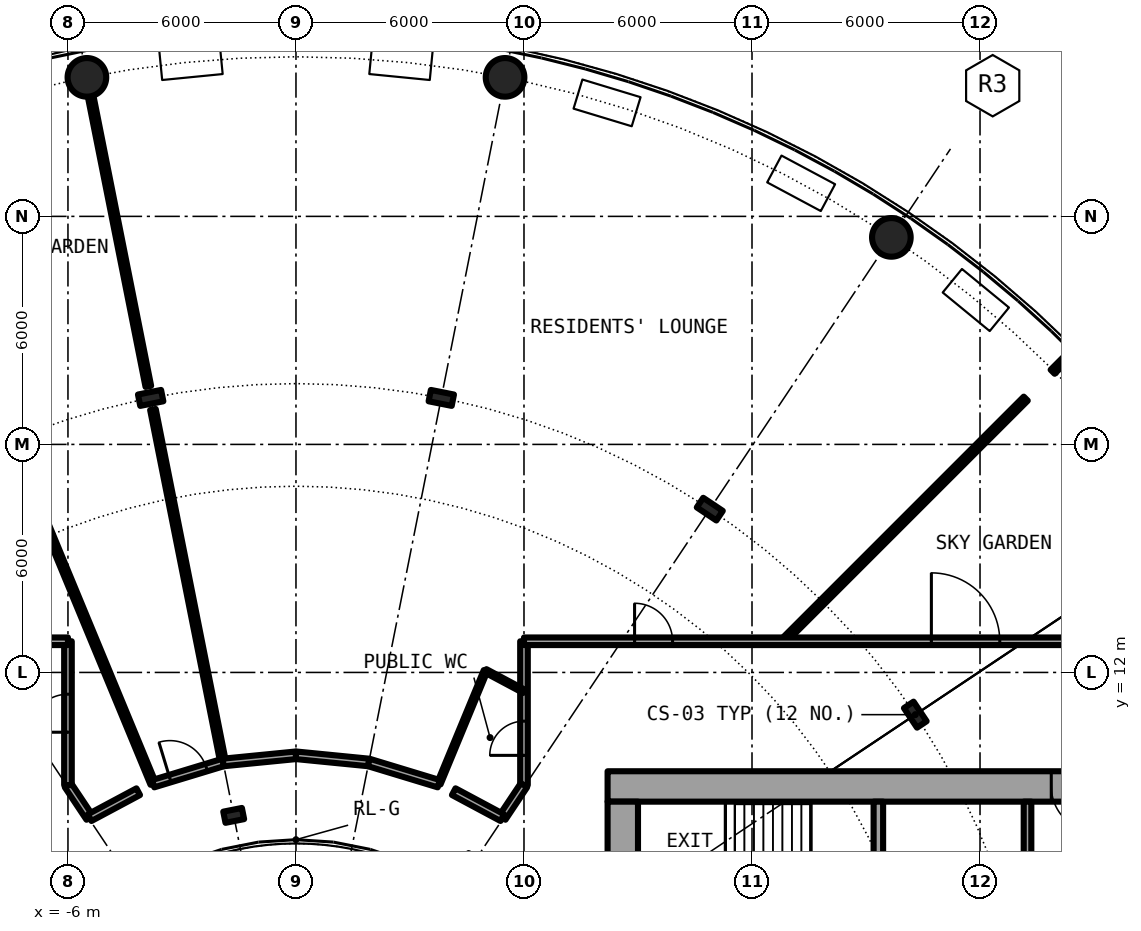
"""IFC4 building model, lengths in metres.
Left out: names, types, materials, properties, quantities, classifications, styles, units other than length and angle.
Written with IfcOpenShell. Run it as: python <this file> out.ifc"""

import sys

from ifc_helpers import new_model, si_unit, direction, frame, frame_2d, origin, origin_2d, place, context, subcontext, project, spatial, rectangle, hollow_circle, i_section, extrude, element, fill, save


model = new_model("IFC4")
c1 = context("Model", 3, precision=1e-05, world=origin(), true_north=direction((0.0, 1.0)))
c2 = subcontext(c1, "Body", "Model", "MODEL_VIEW")
j1 = project(units=[si_unit("LENGTHUNIT", "METRE"), si_unit("PLANEANGLEUNIT", "RADIAN")], contexts=[c1])
p1 = place(None, origin())
s1 = spatial("IfcSite", under=j1, at=p1, CompositionType="ELEMENT")
p2 = place(p1, origin())
s2 = spatial("IfcBuilding", under=s1, at=p2, CompositionType="ELEMENT")
p3 = place(p2, frame((0.0, 0.0, 57.5)))
s3 = spatial("IfcBuildingStorey", under=s2, at=p3, CompositionType="ELEMENT", Elevation=57.5)
for number, where, z_axis, x_axis in (
    (1, (15.667, 23.448, 0.0), (0.0, 0.0, 1.0), (1.0, 0.0, 0.0)),
    (2, (5.501, 27.658, 0.0), (0.0, 0.0, 1.0), (1.0, 0.0, 0.0)),
    (3, (-5.501, 27.658, 0.0), (0.0, 0.0, 1.0), (1.0, 0.0, 0.0)),
):
    element("IfcColumn", number, at=place(p3, frame(where, z_axis=z_axis, x_axis=x_axis)), inside=s3, PredefinedType="COLUMN", context=c2, shape_type="SweptSolid", body=[
        extrude(hollow_circle(Radius=0.508, WallThickness=0.05, at=origin_2d()), origin(), (0.0, 0.0, 1.0), 6.1),
    ])
for number, where, z_axis, x_axis in (
    (4, (16.297, 10.889, 0.0), (0.0, 0.0, 1.0), (0.831, 0.556, 0.0)),
    (5, (10.889, 16.297, 0.0), (0.0, 0.0, 1.0), (0.556, 0.831, 0.0)),
    (6, (3.824, 19.223, 0.0), (0.0, 0.0, 1.0), (0.195, 0.981, 0.0)),
    (7, (-3.824, 19.223, 0.0), (0.0, 0.0, 1.0), (-0.195, 0.981, 0.0)),
):
    element("IfcColumn", number, at=place(p3, frame(where, z_axis=z_axis, x_axis=x_axis)), inside=s3, PredefinedType="COLUMN", context=c2, shape_type="SweptSolid", body=[
        extrude(i_section(OverallWidth=0.305, OverallDepth=0.62, WebThickness=0.021, FlangeThickness=0.04, FilletRadius=0.027, at=origin_2d()), origin(), (0.0, 0.0, 1.0), 6.1),
    ])
p4 = place(p3, frame((-1.639, 8.239, 0.0), z_axis=(0.0, 0.0, 1.0), x_axis=(-0.195090322016, 0.980785280403, 0.0)))
e8 = element("IfcColumn", 8, at=p4, inside=s3, PredefinedType="COLUMN", context=c2, shape_type="SweptSolid", body=[
    extrude(i_section(OverallWidth=0.3, OverallDepth=0.5, WebThickness=0.014, FlangeThickness=0.028, FilletRadius=0.027, at=origin_2d()), origin(), (0.0, 0.0, 1.0), 6.1),
])
p5 = place(p3, frame((22.4, 9.0, 0.0), z_axis=(0.0, 0.0, 1.0), x_axis=(-1.0, 0.0, 0.0)))
e9 = element("IfcWall", 9, at=p5, inside=s3, PredefinedType="SHEAR", context=c2, shape_type="SweptSolid", body=[
    extrude(rectangle(XDim=14.2, YDim=0.8, at=frame_2d((7.1, 0.0))), origin(), (0.0, 0.0, 1.0), 6.1),
])
p6 = place(p5, frame((1.325, 0.0, 0.0)))
e10 = element("IfcOpeningElement", 10, at=p6, cuts=e9, PredefinedType="OPENING", context=c2, shape_type="SweptSolid", body=[
    extrude(rectangle(XDim=1.2, YDim=2.3, at=frame_2d((0.6, 1.15))), frame((0.0, 0.41, 0.0), z_axis=(0.0, -1.0, 0.0), x_axis=(1.0, 0.0, 0.0)), (0.0, 0.0, 1.0), 0.82),
])
p7 = place(p3, frame((8.6, -8.6, 0.0), z_axis=(0.0, 0.0, 1.0), x_axis=(0.0, 1.0, 0.0)))
e11 = element("IfcWall", 11, at=p7, inside=s3, PredefinedType="SHEAR", context=c2, shape_type="SweptSolid", body=[
    extrude(rectangle(XDim=17.2, YDim=0.8, at=frame_2d((8.6, 0.0))), origin(), (0.0, 0.0, 1.0), 6.1),
])
p8 = place(p7, frame((7.4, 0.0, 0.1)))
e12 = element("IfcOpeningElement", 12, at=p8, cuts=e11, PredefinedType="OPENING", context=c2, shape_type="SweptSolid", body=[
    extrude(rectangle(XDim=2.4, YDim=2.2, at=frame_2d((1.2, 1.1))), frame((0.0, 0.41, 0.0), z_axis=(0.0, -1.0, 0.0), x_axis=(1.0, 0.0, 0.0)), (0.0, 0.0, 1.0), 0.82),
])
p9 = place(p3, frame((15.325, 4.65, 0.0), z_axis=(0.0, 0.0, 1.0), x_axis=(0.0, 1.0, 0.0)))
e13 = element("IfcWall", 13, at=p9, inside=s3, PredefinedType="SHEAR", context=c2, shape_type="SweptSolid", body=[
    extrude(rectangle(XDim=3.95, YDim=0.25, at=frame_2d((1.975, 0.0))), origin(), (0.0, 0.0, 1.0), 6.1),
])
p10 = place(p9, frame((1.375, 0.0, 0.0)))
e14 = element("IfcOpeningElement", 14, at=p10, cuts=e13, PredefinedType="OPENING", context=c2, shape_type="SweptSolid", body=[
    extrude(rectangle(XDim=1.2, YDim=2.3, at=frame_2d((0.6, 1.15))), frame((0.0, 0.135, 0.0), z_axis=(0.0, -1.0, 0.0), x_axis=(1.0, 0.0, 0.0)), (0.0, 0.0, 1.0), 0.27),
])
p11 = place(p3, frame((19.25, 1.575, 0.0), z_axis=(0.0, 0.0, 1.0), x_axis=(0.0, 1.0, 0.0)))
e15 = element("IfcWall", 15, at=p11, inside=s3, PredefinedType="SOLIDWALL", context=c2, shape_type="SweptSolid", body=[
    extrude(rectangle(XDim=7.025, YDim=0.2, at=frame_2d((3.513, 0.0))), origin(), (0.0, 0.0, 1.0), 5.75),
])
p12 = place(p11, frame((4.475, 0.0, 0.0)))
e16 = element("IfcOpeningElement", 16, at=p12, cuts=e15, PredefinedType="OPENING", context=c2, shape_type="SweptSolid", body=[
    extrude(rectangle(XDim=1.1, YDim=2.3, at=frame_2d((0.55, 1.15))), frame((0.0, 0.11, 0.0), z_axis=(0.0, -1.0, 0.0), x_axis=(1.0, 0.0, 0.0)), (0.0, 0.0, 1.0), 0.22),
])
p13 = place(p3, frame((6.0, 9.034, 0.0), z_axis=(0.0, 0.0, 1.0), x_axis=(0.0, 1.0, 0.0)))
e17 = element("IfcWall", 17, at=p13, inside=s3, PredefinedType="PARTITIONING", context=c2, shape_type="SweptSolid", body=[
    extrude(rectangle(XDim=3.786, YDim=0.2, at=frame_2d((1.893, 0.0))), origin(), (0.0, 0.0, 1.0), 5.75),
])
p14 = place(p13, frame((0.784, 0.0, 0.0)))
e18 = element("IfcOpeningElement", 18, at=p14, cuts=e17, PredefinedType="OPENING", context=c2, shape_type="SweptSolid", body=[
    extrude(rectangle(XDim=0.9, YDim=2.3, at=frame_2d((0.45, 1.15))), frame((0.0, 0.11, 0.0), z_axis=(0.0, -1.0, 0.0), x_axis=(1.0, 0.0, 0.0)), (0.0, 0.0, 1.0), 0.22),
])
p15 = place(p3, frame((-10.393, 25.091, 0.0), z_axis=(0.0, 0.0, 1.0), x_axis=(0.382668905709, -0.923885549516, 0.0)))
e19 = element("IfcWall", 19, at=p15, inside=s3, PredefinedType="PARTITIONING", context=c2, shape_type="SweptSolid", body=[
    extrude(rectangle(XDim=17.339, YDim=0.15, at=frame_2d((8.669, 0.0))), origin(), (0.0, 0.0, 1.0), 5.75),
])
p16 = place(p3, frame((-5.405, 27.169, 0.0), z_axis=(0.0, 0.0, 1.0), x_axis=(0.195085619607, -0.980786215759, 0.0)))
e20 = element("IfcWall", 20, at=p16, inside=s3, PredefinedType="PARTITIONING", context=c2, shape_type="SweptSolid", body=[
    extrude(rectangle(XDim=7.792, YDim=0.15, at=frame_2d((3.896, 0.0))), origin(), (0.0, 0.0, 1.0), 5.75),
])
p17 = place(p3, frame((-3.764, 18.919, 0.0), z_axis=(0.0, 0.0, 1.0), x_axis=(0.195134385789, -0.980776514545, 0.0)))
e21 = element("IfcWall", 21, at=p17, inside=s3, PredefinedType="PARTITIONING", context=c2, shape_type="SweptSolid", body=[
    extrude(rectangle(XDim=9.47, YDim=0.15, at=frame_2d((4.735, 0.0))), origin(), (0.0, 0.0, 1.0), 5.75),
])
p18 = place(p3, frame((3.758, 9.072, 0.0), z_axis=(0.0, 0.0, 1.0), x_axis=(0.382517205945, 0.923948368231, 0.0)))
e22 = element("IfcWall", 22, at=p18, inside=s3, PredefinedType="PARTITIONING", context=c2, shape_type="SweptSolid", body=[
    extrude(rectangle(XDim=3.216, YDim=0.1, at=frame_2d((1.608, 0.0))), origin(), (0.0, 0.0, 1.0), 5.75),
])
p19 = place(p3, frame((12.82, 12.82, 0.0), z_axis=(0.0, 0.0, 1.0), x_axis=(0.707106781187, 0.707106781187, 0.0)))
e23 = element("IfcWall", 23, at=p19, inside=s3, PredefinedType="PARTITIONING", context=c2, shape_type="SweptSolid", body=[
    extrude(rectangle(XDim=9.028, YDim=0.15, at=frame_2d((4.514, 0.0))), origin(), (0.0, 0.0, 1.0), 5.75),
])
p20 = place(p3, frame((19.911, 19.911, 0.0), z_axis=(0.0, 0.0, 1.0), x_axis=(0.707106781187, 0.707106781187, 0.0)))
e24 = element("IfcWall", 24, at=p20, inside=s3, PredefinedType="PARTITIONING", context=c2, shape_type="SweptSolid", body=[
    extrude(rectangle(XDim=0.642, YDim=0.15, at=frame_2d((0.321, 0.0))), origin(), (0.0, 0.0, 1.0), 5.75),
])
for number, where, z_axis, x_axis in (
    (25, (-6.0, 9.034, 0.0), (0.0, 0.0, 1.0), (0.555, -0.832, 0.0)),
    (26, (5.429, 8.179, 0.0), (0.0, 0.0, 1.0), (0.555, 0.832, 0.0)),
):
    element("IfcWall", number, at=place(p3, frame(where, z_axis=z_axis, x_axis=x_axis)), inside=s3, PredefinedType="PARTITIONING", context=c2, shape_type="SweptSolid", body=[
        extrude(rectangle(XDim=1.028, YDim=0.2, at=frame_2d((0.514, 0.0))), origin(), (0.0, 0.0, 1.0), 5.75),
    ])
p21 = place(p3, frame((-6.0, 9.034, 0.0), z_axis=(0.0, 0.0, 1.0), x_axis=(0.0, 1.0, 0.0)))
e27 = element("IfcWall", 27, at=p21, inside=s3, PredefinedType="PARTITIONING", context=c2, shape_type="SweptSolid", body=[
    extrude(rectangle(XDim=3.786, YDim=0.2, at=frame_2d((1.893, 0.0))), origin(), (0.0, 0.0, 1.0), 5.75),
])
p22 = place(p21, frame((1.393, 0.0, 0.0)))
e28 = element("IfcOpeningElement", 28, at=p22, cuts=e27, PredefinedType="OPENING", context=c2, shape_type="SweptSolid", body=[
    extrude(rectangle(XDim=1.0, YDim=2.3, at=frame_2d((0.5, 1.15))), frame((0.0, 0.11, 0.0), z_axis=(0.0, -1.0, 0.0), x_axis=(1.0, 0.0, 0.0)), (0.0, 0.0, 1.0), 0.22),
])
p23 = place(p3, frame((-5.429, 8.179, 0.0), z_axis=(0.0, 0.0, 1.0), x_axis=(0.88193287619, 0.471375011954, 0.0)))
e29 = element("IfcWall", 29, at=p23, inside=s3, PredefinedType="PARTITIONING", context=c2, shape_type="SweptSolid", body=[
    extrude(rectangle(XDim=1.449, YDim=0.2, at=frame_2d((0.725, 0.0))), origin(), (0.0, 0.0, 1.0), 5.75),
])
p24 = place(p3, frame((-3.758, 9.072, 0.0), z_axis=(0.0, 0.0, 1.0), x_axis=(0.956896312675, 0.29042976223, 0.0)))
e30 = element("IfcWall", 30, at=p24, inside=s3, PredefinedType="PARTITIONING", context=c2, shape_type="SweptSolid", body=[
    extrude(rectangle(XDim=1.925, YDim=0.2, at=frame_2d((0.962, 0.0))), origin(), (0.0, 0.0, 1.0), 5.75),
])
p25 = place(p24, frame((0.462, 0.0, 0.0)))
e31 = element("IfcOpeningElement", 31, at=p25, cuts=e30, PredefinedType="OPENING", context=c2, shape_type="SweptSolid", body=[
    extrude(rectangle(XDim=1.0, YDim=2.3, at=frame_2d((0.5, 1.15))), frame((0.0, 0.11, 0.0), z_axis=(0.0, -1.0, 0.0), x_axis=(1.0, 0.0, 0.0)), (0.0, 0.0, 1.0), 0.22),
])
for number, where, z_axis, x_axis in (
    (32, (-1.916, 9.631, 0.0), (0.0, 0.0, 1.0), (0.995, 0.098, 0.0)),
    (33, (0.0, 9.82, 0.0), (0.0, 0.0, 1.0), (0.995, -0.098, 0.0)),
):
    element("IfcWall", number, at=place(p3, frame(where, z_axis=z_axis, x_axis=x_axis)), inside=s3, PredefinedType="PARTITIONING", context=c2, shape_type="SweptSolid", body=[
        extrude(rectangle(XDim=1.925, YDim=0.2, at=frame_2d((0.963, 0.0))), origin(), (0.0, 0.0, 1.0), 5.75),
    ])
p26 = place(p3, frame((1.916, 9.631, 0.0), z_axis=(0.0, 0.0, 1.0), x_axis=(0.956896312675, -0.29042976223, 0.0)))
e34 = element("IfcWall", 34, at=p26, inside=s3, PredefinedType="PARTITIONING", context=c2, shape_type="SweptSolid", body=[
    extrude(rectangle(XDim=1.925, YDim=0.2, at=frame_2d((0.962, 0.0))), origin(), (0.0, 0.0, 1.0), 5.75),
])
p27 = place(p3, frame((4.151, 8.863, 0.0), z_axis=(0.0, 0.0, 1.0), x_axis=(0.881652665802, -0.471898905364, 0.0)))
e35 = element("IfcWall", 35, at=p27, inside=s3, PredefinedType="PARTITIONING", context=c2, shape_type="SweptSolid", body=[
    extrude(rectangle(XDim=1.45, YDim=0.2, at=frame_2d((0.725, 0.0))), origin(), (0.0, 0.0, 1.0), 5.75),
])
p28 = place(p3, frame((-21.9, 12.82, 0.0), z_axis=(0.0, 0.0, 1.0), x_axis=(1.0, 0.0, 0.0)))
e36 = element("IfcWall", 36, at=p28, inside=s3, PredefinedType="PARTITIONING", context=c2, shape_type="SweptSolid", body=[
    extrude(rectangle(XDim=15.9, YDim=0.2, at=frame_2d((7.95, 0.0))), origin(), (0.0, 0.0, 1.0), 5.75),
])
p29 = place(p28, frame((10.707, 0.0, 0.0)))
e37 = element("IfcOpeningElement", 37, at=p29, cuts=e36, PredefinedType="OPENING", context=c2, shape_type="SweptSolid", body=[
    extrude(rectangle(XDim=1.0, YDim=2.3, at=frame_2d((0.5, 1.15))), frame((0.0, 0.11, 0.0), z_axis=(0.0, -1.0, 0.0), x_axis=(1.0, 0.0, 0.0)), (0.0, 0.0, 1.0), 0.22),
])
p30 = place(p28, frame((3.45, 0.0, 0.0)))
e38 = element("IfcOpeningElement", 38, at=p30, cuts=e36, PredefinedType="OPENING", context=c2, shape_type="SweptSolid", body=[
    extrude(rectangle(XDim=1.8, YDim=2.3, at=frame_2d((0.9, 1.15))), frame((0.0, 0.11, 0.0), z_axis=(0.0, -1.0, 0.0), x_axis=(1.0, 0.0, 0.0)), (0.0, 0.0, 1.0), 0.22),
])
p31 = place(p3, frame((6.0, 12.82, 0.0), z_axis=(0.0, 0.0, 1.0), x_axis=(1.0, 0.0, 0.0)))
e39 = element("IfcWall", 39, at=p31, inside=s3, PredefinedType="PARTITIONING", context=c2, shape_type="SweptSolid", body=[
    extrude(rectangle(XDim=15.9, YDim=0.2, at=frame_2d((7.95, 0.0))), origin(), (0.0, 0.0, 1.0), 5.75),
])
p32 = place(p31, frame((2.91, 0.0, 0.0)))
e40 = element("IfcOpeningElement", 40, at=p32, cuts=e39, PredefinedType="OPENING", context=c2, shape_type="SweptSolid", body=[
    extrude(rectangle(XDim=1.0, YDim=2.3, at=frame_2d((0.5, 1.15))), frame((0.0, 0.11, 0.0), z_axis=(0.0, -1.0, 0.0), x_axis=(1.0, 0.0, 0.0)), (0.0, 0.0, 1.0), 0.22),
])
p33 = place(p31, frame((10.72, 0.0, 0.0)))
e41 = element("IfcOpeningElement", 41, at=p33, cuts=e39, PredefinedType="OPENING", context=c2, shape_type="SweptSolid", body=[
    extrude(rectangle(XDim=1.8, YDim=2.3, at=frame_2d((0.9, 1.15))), frame((0.0, 0.11, 0.0), z_axis=(0.0, -1.0, 0.0), x_axis=(1.0, 0.0, 0.0)), (0.0, 0.0, 1.0), 0.22),
])
p34 = place(p3, frame((4.988, 12.043, 0.0), z_axis=(0.0, 0.0, 1.0), x_axis=(0.882235076446, -0.470809165042, 0.0)))
e42 = element("IfcWall", 42, at=p34, inside=s3, PredefinedType="PARTITIONING", context=c2, shape_type="SweptSolid", body=[
    extrude(rectangle(XDim=1.147, YDim=0.1, at=frame_2d((0.573, 0.0))), origin(), (0.0, 0.0, 1.0), 5.75),
])
p35 = place(p6, origin())
e43 = element("IfcDoor", 43, at=p35, inside=s3, OperationType="SINGLE_SWING_RIGHT", PredefinedType="DOOR", context=c2, shape_type="SweptSolid", body=[
    extrude(rectangle(XDim=1.2, YDim=2.3, at=frame_2d((0.6, 1.15))), frame((0.0, 0.025, 0.0), z_axis=(0.0, -1.0, 0.0), x_axis=(1.0, 0.0, 0.0)), (0.0, 0.0, 1.0), 0.05),
])
fill(e10, e43)
p36 = place(p14, origin())
e44 = element("IfcDoor", 44, at=p36, inside=s3, OperationType="SINGLE_SWING_LEFT", PredefinedType="DOOR", context=c2, shape_type="SweptSolid", body=[
    extrude(rectangle(XDim=0.9, YDim=2.3, at=frame_2d((0.45, 1.15))), frame((0.0, 0.025, 0.0), z_axis=(0.0, -1.0, 0.0), x_axis=(1.0, 0.0, 0.0)), (0.0, 0.0, 1.0), 0.05),
])
fill(e18, e44)
p37 = place(p32, origin())
e45 = element("IfcDoor", 45, at=p37, inside=s3, OperationType="SINGLE_SWING_LEFT", PredefinedType="DOOR", context=c2, shape_type="SweptSolid", body=[
    extrude(rectangle(XDim=1.0, YDim=2.3, at=frame_2d((0.5, 1.15))), frame((0.0, 0.025, 0.0), z_axis=(0.0, -1.0, 0.0), x_axis=(1.0, 0.0, 0.0)), (0.0, 0.0, 1.0), 0.05),
])
fill(e40, e45)
p38 = place(p25, origin())
e46 = element("IfcDoor", 46, at=p38, inside=s3, OperationType="SINGLE_SWING_RIGHT", PredefinedType="DOOR", context=c2, shape_type="SweptSolid", body=[
    extrude(rectangle(XDim=1.0, YDim=2.3, at=frame_2d((0.5, 1.15))), frame((0.0, 0.025, 0.0), z_axis=(0.0, -1.0, 0.0), x_axis=(1.0, 0.0, 0.0)), (0.0, 0.0, 1.0), 0.05),
])
fill(e31, e46)
p39 = place(p22, origin())
e47 = element("IfcDoor", 47, at=p39, inside=s3, OperationType="SINGLE_SWING_LEFT", PredefinedType="DOOR", context=c2, shape_type="SweptSolid", body=[
    extrude(rectangle(XDim=1.0, YDim=2.3, at=frame_2d((0.5, 1.15))), frame((0.0, 0.025, 0.0), z_axis=(0.0, -1.0, 0.0), x_axis=(1.0, 0.0, 0.0)), (0.0, 0.0, 1.0), 0.05),
])
fill(e28, e47)
p40 = place(p33, origin())
e48 = element("IfcDoor", 48, at=p40, inside=s3, OperationType="DOUBLE_DOOR_SINGLE_SWING", PredefinedType="DOOR", context=c2, shape_type="SweptSolid", body=[
    extrude(rectangle(XDim=1.8, YDim=2.3, at=frame_2d((0.9, 1.15))), frame((0.0, 0.025, 0.0), z_axis=(0.0, -1.0, 0.0), x_axis=(1.0, 0.0, 0.0)), (0.0, 0.0, 1.0), 0.05),
])
fill(e41, e48)
save(model, sys.argv[1])
